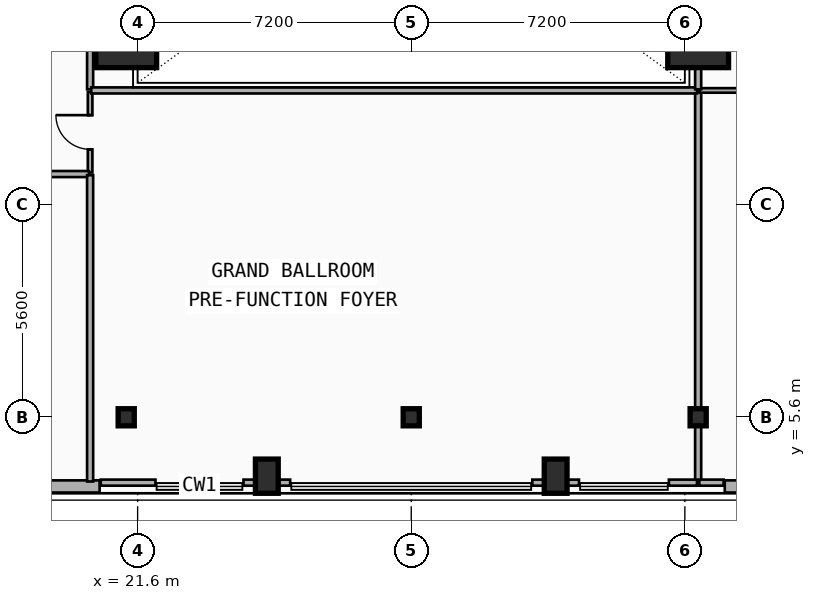
"""IFC4 building model, lengths in metres.
Left out: names, types, materials, properties, quantities, classifications, styles, units other than length and angle.
Written with IfcOpenShell. Run it as: python <this file> out.ifc"""

import sys

from ifc_helpers import new_model, si_unit, direction, frame, frame_2d, origin, origin_2d, place, context, subcontext, project, spatial, rectangle, i_section, extrude, element, fill, save


model = new_model("IFC4")
c1 = context("Model", 3, precision=1e-05, world=origin(), true_north=direction((0.0, 1.0)))
c2 = subcontext(c1, "Body", "Model", "MODEL_VIEW")
j1 = project(units=[si_unit("LENGTHUNIT", "METRE"), si_unit("PLANEANGLEUNIT", "RADIAN")], contexts=[c1])
p1 = place(None, origin())
s1 = spatial("IfcSite", under=j1, at=p1, CompositionType="ELEMENT")
p2 = place(p1, origin())
s2 = spatial("IfcBuilding", under=s1, at=p2, CompositionType="ELEMENT")
p3 = place(p2, frame((0.0, 0.0, 19.4)))
s3 = spatial("IfcBuildingStorey", under=s2, at=p3, CompositionType="ELEMENT", Elevation=19.4)
p4 = place(p3, frame((21.3, 5.6, 0.0), z_axis=(0.0, 0.0, 1.0), x_axis=(1.0, 0.0, 0.0)))
e1 = element("IfcColumn", 1, at=p4, inside=s3, PredefinedType="COLUMN", context=c2, shape_type="SweptSolid", body=[
    extrude(i_section(OverallWidth=0.424, OverallDepth=0.45, WebThickness=0.041, FlangeThickness=0.065, FilletRadius=0.015, at=origin_2d()), origin(), (0.0, 0.0, 1.0), 4.8),
])
p5 = place(p3, frame((21.3, 15.6, 0.0), z_axis=(0.0, 0.0, 1.0), x_axis=(1.0, 0.0, 0.0)))
e2 = element("IfcColumn", 2, at=p5, inside=s3, PredefinedType="COLUMN", context=c2, shape_type="SweptSolid", body=[
    extrude(rectangle(XDim=1.6, YDim=1.6, at=origin_2d()), origin(), (0.0, 0.0, 1.0), 4.8),
])
for number, where, z_axis, x_axis in (
    (3, (28.8, 5.6, 0.0), (0.0, 0.0, 1.0), (1.0, 0.0, 0.0)),
    (4, (36.35, 5.6, 0.0), (0.0, 0.0, 1.0), (1.0, 0.0, 0.0)),
):
    element("IfcColumn", number, at=place(p3, frame(where, z_axis=z_axis, x_axis=x_axis)), inside=s3, PredefinedType="COLUMN", context=c2, shape_type="SweptSolid", body=[
        extrude(i_section(OverallWidth=0.424, OverallDepth=0.45, WebThickness=0.041, FlangeThickness=0.065, FilletRadius=0.015, at=origin_2d()), origin(), (0.0, 0.0, 1.0), 4.8),
    ])
p6 = place(p3, frame((36.35, 15.6, 0.0), z_axis=(0.0, 0.0, 1.0), x_axis=(1.0, 0.0, 0.0)))
e5 = element("IfcColumn", 5, at=p6, inside=s3, PredefinedType="COLUMN", context=c2, shape_type="SweptSolid", body=[
    extrude(rectangle(XDim=1.6, YDim=1.6, at=origin_2d()), origin(), (0.0, 0.0, 1.0), 4.8),
])
for number, where, z_axis, x_axis in (
    (6, (25.0, 4.05, 0.0), (0.0, 0.0, 1.0), (1.0, 0.0, 0.0)),
    (7, (32.6, 4.05, 0.0), (0.0, 0.0, 1.0), (1.0, 0.0, 0.0)),
):
    element("IfcColumn", number, at=place(p3, frame(where, z_axis=z_axis, x_axis=x_axis)), inside=s3, PredefinedType="PILASTER", context=c2, shape_type="SweptSolid", body=[
        extrude(rectangle(XDim=0.6, YDim=0.9, at=origin_2d()), origin(), (0.0, 0.0, 1.0), 4.8),
    ])
p7 = place(p3, frame((20.6, 3.78, 0.0), z_axis=(0.0, 0.0, 1.0), x_axis=(-1.0, 0.0, 0.0)))
e8 = element("IfcWall", 8, at=p7, inside=s3, PredefinedType="SOLIDWALL", context=c2, shape_type="SweptSolid", body=[
    extrude(rectangle(XDim=17.0, YDim=0.32, at=frame_2d((8.5, 0.0))), origin(), (0.0, 0.0, 1.0), 4.5),
])
p8 = place(p7, frame((13.338, 0.0, 0.9)))
e9 = element("IfcOpeningElement", 9, at=p8, cuts=e8, PredefinedType="OPENING", context=c2, shape_type="SweptSolid", body=[
    extrude(rectangle(XDim=2.4, YDim=1.8, at=frame_2d((1.2, 0.9))), frame((0.0, 0.17, 0.0), z_axis=(0.0, -1.0, 0.0), x_axis=(1.0, 0.0, 0.0)), (0.0, 0.0, 1.0), 0.34),
])
p9 = place(p7, frame((5.148, 0.0, 0.9)))
e10 = element("IfcOpeningElement", 10, at=p9, cuts=e8, PredefinedType="OPENING", context=c2, shape_type="SweptSolid", body=[
    extrude(rectangle(XDim=2.4, YDim=1.8, at=frame_2d((1.2, 0.9))), frame((0.0, 0.17, 0.0), z_axis=(0.0, -1.0, 0.0), x_axis=(1.0, 0.0, 0.0)), (0.0, 0.0, 1.0), 0.34),
])
p10 = place(p3, frame((54.0, 3.78, 0.0), z_axis=(0.0, 0.0, 1.0), x_axis=(-1.0, 0.0, 0.0)))
e11 = element("IfcWall", 11, at=p10, inside=s3, PredefinedType="SOLIDWALL", context=c2, shape_type="SweptSolid", body=[
    extrude(rectangle(XDim=16.95, YDim=0.32, at=frame_2d((8.475, 0.0))), origin(), (0.0, 0.0, 1.0), 4.5),
])
p11 = place(p10, frame((9.452, 0.0, 0.9)))
e12 = element("IfcOpeningElement", 12, at=p11, cuts=e11, PredefinedType="OPENING", context=c2, shape_type="SweptSolid", body=[
    extrude(rectangle(XDim=2.4, YDim=1.8, at=frame_2d((1.2, 0.9))), frame((0.0, 0.17, 0.0), z_axis=(0.0, -1.0, 0.0), x_axis=(1.0, 0.0, 0.0)), (0.0, 0.0, 1.0), 0.34),
])
p12 = place(p10, frame((1.262, 0.0, 0.9)))
e13 = element("IfcOpeningElement", 13, at=p12, cuts=e11, PredefinedType="OPENING", context=c2, shape_type="SweptSolid", body=[
    extrude(rectangle(XDim=2.4, YDim=1.8, at=frame_2d((1.2, 0.9))), frame((0.0, 0.17, 0.0), z_axis=(0.0, -1.0, 0.0), x_axis=(1.0, 0.0, 0.0)), (0.0, 0.0, 1.0), 0.34),
])
p13 = place(p3, frame((20.35, 12.04, 0.0), z_axis=(0.0, 0.0, 1.0), x_axis=(0.0, 1.0, 0.0)))
e14 = element("IfcWall", 14, at=p13, inside=s3, PredefinedType="PARTITIONING", context=c2, shape_type="SweptSolid", body=[
    extrude(rectangle(XDim=2.12, YDim=0.12, at=frame_2d((1.06, 0.0))), origin(), (0.0, 0.0, 1.0), 4.12),
])
p14 = place(p13, frame((0.61, 0.0, 0.0)))
e15 = element("IfcOpeningElement", 15, at=p14, cuts=e14, PredefinedType="OPENING", context=c2, shape_type="SweptSolid", body=[
    extrude(rectangle(XDim=0.9, YDim=2.1, at=frame_2d((0.45, 1.05))), frame((0.0, 0.07, 0.0), z_axis=(0.0, -1.0, 0.0), x_axis=(1.0, 0.0, 0.0)), (0.0, 0.0, 1.0), 0.14),
])
p15 = place(p3, frame((36.35, 3.88, 0.0), z_axis=(0.0, 0.0, 1.0), x_axis=(0.0, 1.0, 0.0)))
e16 = element("IfcWall", 16, at=p15, inside=s3, PredefinedType="PARTITIONING", context=c2, shape_type="SweptSolid", body=[
    extrude(rectangle(XDim=10.28, YDim=0.16, at=frame_2d((5.14, 0.0))), origin(), (0.0, 0.0, 1.0), 3.666),
])
p16 = place(p3, frame((36.39, 14.2, 0.0), z_axis=(0.0, 0.0, 1.0), x_axis=(1.0, 0.0, 0.0)))
e17 = element("IfcWall", 17, at=p16, inside=s3, PredefinedType="PARTITIONING", context=c2, shape_type="SweptSolid", body=[
    extrude(rectangle(XDim=8.97, YDim=0.12, at=frame_2d((4.485, 0.0))), origin(), (0.0, 0.0, 1.0), 3.666),
])
p17 = place(p16, frame((4.035, 0.0, 0.0)))
e18 = element("IfcOpeningElement", 18, at=p17, cuts=e17, PredefinedType="OPENING", context=c2, shape_type="SweptSolid", body=[
    extrude(rectangle(XDim=0.9, YDim=2.1, at=frame_2d((0.45, 1.05))), frame((0.0, 0.07, 0.0), z_axis=(0.0, -1.0, 0.0), x_axis=(1.0, 0.0, 0.0)), (0.0, 0.0, 1.0), 0.14),
])
p18 = place(p3, frame((18.83, 12.0, 0.0), z_axis=(0.0, 0.0, 1.0), x_axis=(1.0, 0.0, 0.0)))
e19 = element("IfcWall", 19, at=p18, inside=s3, PredefinedType="PARTITIONING", context=c2, shape_type="SweptSolid", body=[
    extrude(rectangle(XDim=1.49, YDim=0.16, at=frame_2d((0.745, 0.0))), origin(), (0.0, 0.0, 1.0), 4.12),
])
p19 = place(p3, frame((20.35, 14.23, 0.0), z_axis=(0.0, 0.0, 1.0), x_axis=(0.0, 1.0, 0.0)))
e20 = element("IfcWall", 20, at=p19, inside=s3, PredefinedType="PARTITIONING", context=c2, shape_type="SweptSolid", body=[
    extrude(rectangle(XDim=11.19, YDim=0.16, at=frame_2d((5.595, 0.0))), origin(), (0.0, 0.0, 1.0), 3.472),
])
p20 = place(p3, frame((20.63, 3.88, 0.0), z_axis=(0.0, 0.0, 1.0), x_axis=(1.0, 0.0, 0.0)))
e21 = element("IfcWall", 21, at=p20, inside=s3, PredefinedType="PARTITIONING", context=c2, shape_type="SweptSolid", body=[
    extrude(rectangle(XDim=1.44, YDim=0.16, at=frame_2d((0.72, 0.0))), origin(), (0.0, 0.0, 1.0), 4.5),
])
for number, where, z_axis, x_axis in (
    (22, (24.386, 3.88, 0.0), (0.0, 0.0, 1.0), (1.0, 0.0, 0.0)),
    (23, (31.986, 3.88, 0.0), (0.0, 0.0, 1.0), (1.0, 0.0, 0.0)),
):
    element("IfcWall", number, at=place(p3, frame(where, z_axis=z_axis, x_axis=x_axis)), inside=s3, PredefinedType="PARTITIONING", context=c2, shape_type="SweptSolid", body=[
        extrude(rectangle(XDim=1.228, YDim=0.16, at=frame_2d((0.614, 0.0))), origin(), (0.0, 0.0, 1.0), 4.5),
    ])
p21 = place(p3, frame((35.58, 3.88, 0.0), z_axis=(0.0, 0.0, 1.0), x_axis=(1.0, 0.0, 0.0)))
e24 = element("IfcWall", 24, at=p21, inside=s3, PredefinedType="PARTITIONING", context=c2, shape_type="SweptSolid", body=[
    extrude(rectangle(XDim=0.74, YDim=0.16, at=frame_2d((0.37, 0.0))), origin(), (0.0, 0.0, 1.0), 4.5),
])
p22 = place(p3, frame((20.38, 14.2, 0.0), z_axis=(0.0, 0.0, 1.0), x_axis=(1.0, 0.0, 0.0)))
e25 = element("IfcWall", 25, at=p22, inside=s3, PredefinedType="PARTITIONING", context=c2, shape_type="SweptSolid", body=[
    extrude(rectangle(XDim=15.94, YDim=0.16, at=frame_2d((7.97, 0.0))), origin(), (0.0, 0.0, 1.0), 3.666),
])
p23 = place(p3, frame((20.35, 3.91, 0.0), z_axis=(0.0, 0.0, 1.0), x_axis=(0.0, 1.0, 0.0)))
e26 = element("IfcWall", 26, at=p23, inside=s3, PredefinedType="PARTITIONING", context=c2, shape_type="SweptSolid", body=[
    extrude(rectangle(XDim=8.06, YDim=0.16, at=frame_2d((4.03, 0.0))), origin(), (0.0, 0.0, 1.0), 3.83),
])
p24 = place(p3, frame((36.38, 3.88, 0.0), z_axis=(0.0, 0.0, 1.0), x_axis=(1.0, 0.0, 0.0)))
e27 = element("IfcWall", 27, at=p24, inside=s3, PredefinedType="PARTITIONING", context=c2, shape_type="SweptSolid", body=[
    extrude(rectangle(XDim=0.64, YDim=0.16, at=frame_2d((0.32, 0.0))), origin(), (0.0, 0.0, 1.0), 4.5),
])
p25 = place(p3, frame((36.35, 14.23, 0.0), z_axis=(0.0, 0.0, 1.0), x_axis=(0.0, 1.0, 0.0)))
e28 = element("IfcWall", 28, at=p25, inside=s3, PredefinedType="PARTITIONING", context=c2, shape_type="SweptSolid", body=[
    extrude(rectangle(XDim=11.19, YDim=0.16, at=frame_2d((5.595, 0.0))), origin(), (0.0, 0.0, 1.0), 3.472),
])
p26 = place(p14, origin())
e29 = element("IfcDoor", 29, at=p26, inside=s3, OperationType="SINGLE_SWING_RIGHT", PredefinedType="DOOR", context=c2, shape_type="SweptSolid", body=[
    extrude(rectangle(XDim=0.9, YDim=2.1, at=frame_2d((0.45, 1.05))), frame((0.0, 0.025, 0.0), z_axis=(0.0, -1.0, 0.0), x_axis=(1.0, 0.0, 0.0)), (0.0, 0.0, 1.0), 0.05),
])
fill(e15, e29)
save(model, sys.argv[1])
